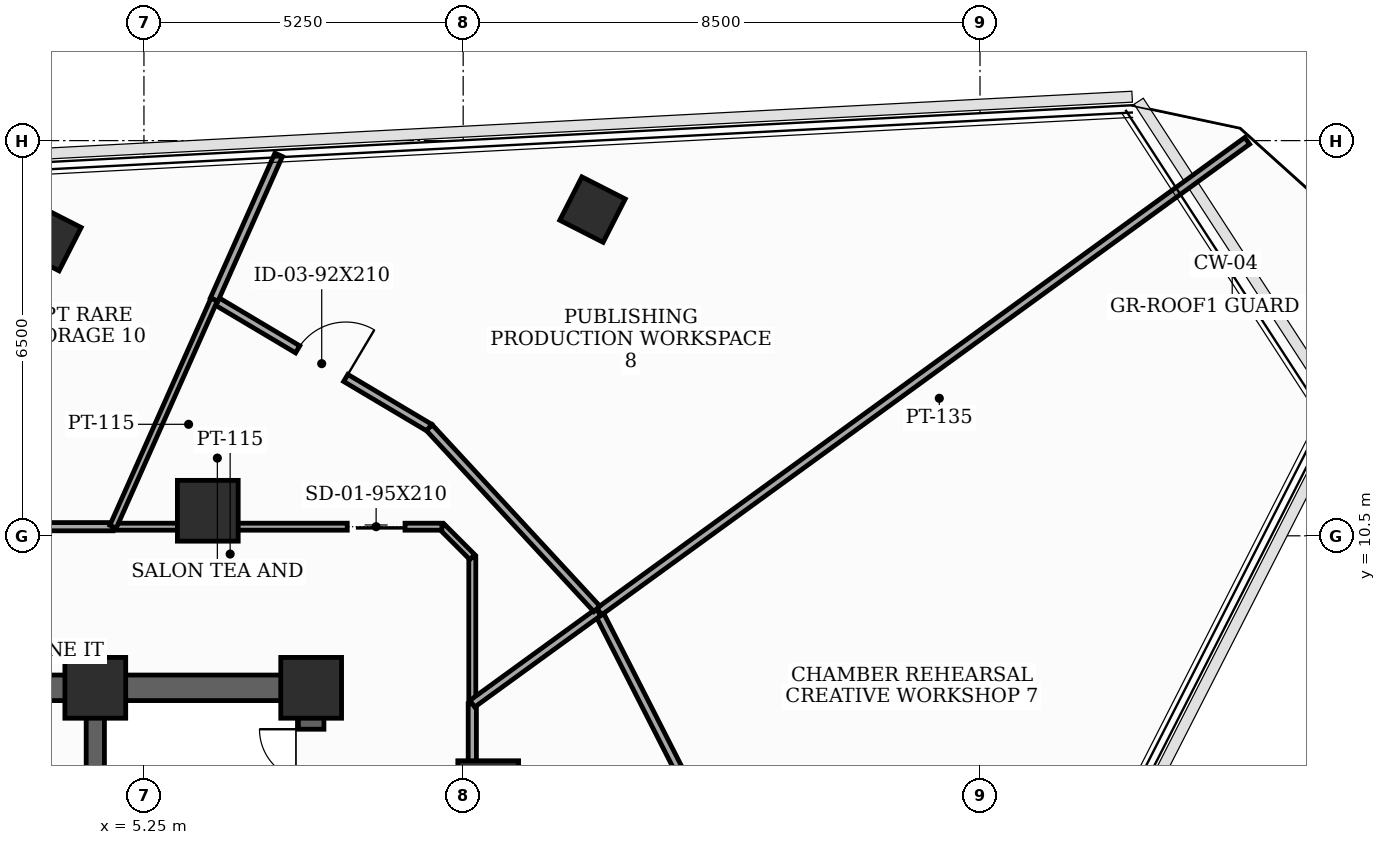
"""IFC4 building model, lengths in metres.
Left out: names, types, materials, properties, quantities, classifications, styles, units other than length and angle.
Written with IfcOpenShell. Run it as: python <this file> out.ifc"""

import sys

from ifc_helpers import new_model, si_unit, direction, frame, frame_2d, origin, origin_2d, place, context, subcontext, project, spatial, rectangle, extrude, element, fill, save


model = new_model("IFC4")
c1 = context("Model", 3, precision=1e-05, world=origin(), true_north=direction((0.0, 1.0)))
c2 = subcontext(c1, "Body", "Model", "MODEL_VIEW")
j1 = project(units=[si_unit("LENGTHUNIT", "METRE"), si_unit("PLANEANGLEUNIT", "RADIAN")], contexts=[c1])
p1 = place(None, origin())
s1 = spatial("IfcSite", under=j1, at=p1, CompositionType="ELEMENT")
p2 = place(p1, origin())
s2 = spatial("IfcBuilding", under=s1, at=p2, CompositionType="ELEMENT")
p3 = place(p2, frame((0.0, 0.0, 255.9)))
s3 = spatial("IfcBuildingStorey", under=s2, at=p3, CompositionType="ELEMENT", Elevation=255.9)
for number, where, z_axis, x_axis in (
    (1, (8.0, 8.0, 0.0), (0.0, 0.0, 1.0), (1.0, 0.0, 0.0)),
    (2, (4.45, 8.0, 0.0), (0.0, 0.0, 1.0), (1.0, 0.0, 0.0)),
    (3, (10.912, 6.3, 0.0), (0.0, 0.0, 1.0), (1.0, 0.0, 0.0)),
    (4, (6.3, 10.912, 0.0), (0.0, 0.0, 1.0), (1.0, 0.0, 0.0)),
):
    element("IfcColumn", number, at=place(p3, frame(where, z_axis=z_axis, x_axis=x_axis)), inside=s3, PredefinedType="COLUMN", context=c2, shape_type="SweptSolid", body=[
        extrude(rectangle(XDim=1.0, YDim=1.0, at=origin_2d()), origin(), (0.0, 0.0, 1.0), 3.7),
    ])
for number, where, z_axis, x_axis in (
    (5, (12.627, 15.865, 0.0), (0.0, 0.0, 1.0), (0.454, 0.891, 0.0)),
    (6, (3.679, 15.396, 0.0), (0.0, 0.0, 1.0), (0.454, 0.891, 0.0)),
):
    element("IfcColumn", number, at=place(p3, frame(where, z_axis=z_axis, x_axis=x_axis)), inside=s3, PredefinedType="COLUMN", context=c2, shape_type="SweptSolid", body=[
        extrude(rectangle(XDim=0.8, YDim=0.8, at=origin_2d()), origin(), (0.0, 0.0, 1.0), 3.7),
    ])
p4 = place(p3, frame((8.0, -8.0, 0.0), z_axis=(0.0, 0.0, 1.0), x_axis=(0.0, 1.0, 0.0)))
e7 = element("IfcWall", 7, at=p4, inside=s3, PredefinedType="SHEAR", context=c2, shape_type="SweptSolid", body=[
    extrude(rectangle(XDim=16.0, YDim=0.42, at=frame_2d((8.0, 0.0))), origin(), (0.0, 0.0, 1.0), 3.5),
])
p5 = place(p4, frame((9.6, 0.0, 0.0)))
e8 = element("IfcOpeningElement", 8, at=p5, cuts=e7, PredefinedType="OPENING", context=c2, shape_type="SweptSolid", body=[
    extrude(rectangle(XDim=1.05, YDim=2.15, at=frame_2d((0.525, 1.075))), frame((0.0, 0.22, 0.0), z_axis=(0.0, -1.0, 0.0), x_axis=(1.0, 0.0, 0.0)), (0.0, 0.0, 1.0), 0.44),
])
p6 = place(p4, frame((14.469, 0.0, 0.0)))
e9 = element("IfcOpeningElement", 9, at=p6, cuts=e7, PredefinedType="OPENING", context=c2, shape_type="SweptSolid", body=[
    extrude(rectangle(XDim=0.85, YDim=2.02, at=frame_2d((0.425, 1.01))), frame((0.0, 0.22, 0.0), z_axis=(0.0, -1.0, 0.0), x_axis=(1.0, 0.0, 0.0)), (0.0, 0.0, 1.0), 0.44),
])
p7 = place(p3, frame((-8.0, 8.0, 0.0), z_axis=(0.0, 0.0, 1.0), x_axis=(1.0, 0.0, 0.0)))
e10 = element("IfcWall", 10, at=p7, inside=s3, PredefinedType="SHEAR", context=c2, shape_type="SweptSolid", body=[
    extrude(rectangle(XDim=16.0, YDim=0.42, at=frame_2d((8.0, 0.0))), origin(), (0.0, 0.0, 1.0), 3.5),
])
p8 = place(p7, frame((7.1, 0.0, 0.0)))
e11 = element("IfcOpeningElement", 11, at=p8, cuts=e10, PredefinedType="OPENING", context=c2, shape_type="SweptSolid", body=[
    extrude(rectangle(XDim=1.8, YDim=2.15, at=frame_2d((0.9, 1.075))), frame((0.0, 0.22, 0.0), z_axis=(0.0, -1.0, 0.0), x_axis=(1.0, 0.0, 0.0)), (0.0, 0.0, 1.0), 0.44),
])
p9 = place(p3, frame((4.45, -7.79, 0.0), z_axis=(0.0, 0.0, 1.0), x_axis=(0.0, 1.0, 0.0)))
e12 = element("IfcWall", 12, at=p9, inside=s3, PredefinedType="SHEAR", context=c2, shape_type="SweptSolid", body=[
    extrude(rectangle(XDim=15.58, YDim=0.3, at=frame_2d((7.79, 0.0))), origin(), (0.0, 0.0, 1.0), 3.5),
])
p10 = place(p3, frame((10.65, 4.225, 0.0), z_axis=(0.0, 0.0, 1.0), x_axis=(0.0, 1.0, 0.0)))
e13 = element("IfcWall", 13, at=p10, inside=s3, PredefinedType="PARTITIONING", context=c2, shape_type="SweptSolid", body=[
    extrude(rectangle(XDim=3.513, YDim=0.135, at=frame_2d((1.756, 0.0))), origin(), (0.0, 0.0, 1.0), 2.885),
])
p11 = place(p3, frame((10.65, 7.738, 0.0), z_axis=(0.0, 0.0, 1.0), x_axis=(0.0, 1.0, 0.0)))
e14 = element("IfcWall", 14, at=p11, inside=s3, PredefinedType="PARTITIONING", context=c2, shape_type="SweptSolid", body=[
    extrude(rectangle(XDim=2.412, YDim=0.115, at=frame_2d((1.206, 0.0))), origin(), (0.0, 0.0, 1.0), 3.5),
])
p12 = place(p3, frame((10.65, 10.15, 0.0), z_axis=(0.0, 0.0, 1.0), x_axis=(-0.707106781187, 0.707106781187, 0.0)))
e15 = element("IfcWall", 15, at=p12, inside=s3, PredefinedType="PARTITIONING", context=c2, shape_type="SweptSolid", body=[
    extrude(rectangle(XDim=0.707, YDim=0.115, at=frame_2d((0.354, 0.0))), origin(), (0.0, 0.0, 1.0), 3.5),
])
p13 = place(p3, frame((10.15, 10.65, 0.0), z_axis=(0.0, 0.0, 1.0), x_axis=(-1.0, 0.0, 0.0)))
e16 = element("IfcWall", 16, at=p13, inside=s3, PredefinedType="PARTITIONING", context=c2, shape_type="SweptSolid", body=[
    extrude(rectangle(XDim=5.408, YDim=0.115, at=frame_2d((2.704, 0.0))), origin(), (0.0, 0.0, 1.0), 2.885),
])
p14 = place(p13, frame((0.607, 0.0, 0.0)))
e17 = element("IfcOpeningElement", 17, at=p14, cuts=e16, PredefinedType="OPENING", context=c2, shape_type="SweptSolid", body=[
    extrude(rectangle(XDim=0.95, YDim=2.1, at=frame_2d((0.475, 1.05))), frame((0.0, 0.067, 0.0), z_axis=(0.0, -1.0, 0.0), x_axis=(1.0, 0.0, 0.0)), (0.0, 0.0, 1.0), 0.135),
])
p15 = place(p3, frame((4.742, 10.65, 0.0), z_axis=(0.0, 0.0, 1.0), x_axis=(-1.0, 0.0, 0.0)))
e18 = element("IfcWall", 18, at=p15, inside=s3, PredefinedType="PARTITIONING", context=c2, shape_type="SweptSolid", body=[
    extrude(rectangle(XDim=5.892, YDim=0.135, at=frame_2d((2.946, 0.0))), origin(), (0.0, 0.0, 1.0), 2.885),
])
p16 = place(p15, frame((2.471, 0.0, 0.0)))
e19 = element("IfcOpeningElement", 19, at=p16, cuts=e18, PredefinedType="OPENING", context=c2, shape_type="SweptSolid", body=[
    extrude(rectangle(XDim=0.95, YDim=2.1, at=frame_2d((0.475, 1.05))), frame((0.0, 0.077, 0.0), z_axis=(0.0, -1.0, 0.0), x_axis=(1.0, 0.0, 0.0)), (0.0, 0.0, 1.0), 0.155),
])
p17 = place(p3, frame((15.149, 4.487, 0.0), z_axis=(0.0, 0.0, 1.0), x_axis=(-0.453912768225, 0.891046126102, 0.0)))
e20 = element("IfcWall", 20, at=p17, inside=s3, PredefinedType="PARTITIONING", context=c2, shape_type="SweptSolid", body=[
    extrude(rectangle(XDim=5.34, YDim=0.135, at=frame_2d((2.67, 0.0))), origin(), (0.0, 0.0, 1.0), 3.185),
])
p18 = place(p3, frame((12.725, 9.245, 0.0), z_axis=(0.0, 0.0, 1.0), x_axis=(-0.809135191367, -0.587622533683, 0.0)))
e21 = element("IfcWall", 21, at=p18, inside=s3, PredefinedType="PARTITIONING", context=c2, shape_type="SweptSolid", body=[
    extrude(rectangle(XDim=2.565, YDim=0.135, at=frame_2d((1.282, 0.0))), origin(), (0.0, 0.0, 1.0), 3.185),
])
p19 = place(p3, frame((23.394, 16.997, 0.0), z_axis=(0.0, 0.0, 1.0), x_axis=(-0.80901413128, -0.587789192985, 0.0)))
e22 = element("IfcWall", 22, at=p19, inside=s3, PredefinedType="PARTITIONING", context=c2, shape_type="SweptSolid", body=[
    extrude(rectangle(XDim=13.171, YDim=0.135, at=frame_2d((6.586, 0.0))), origin(), (0.0, 0.0, 1.0), 3.035),
])
p20 = place(p3, frame((6.404, 14.384, 0.0), z_axis=(0.0, 0.0, 1.0), x_axis=(0.859464079119, -0.511196143085, 0.0)))
e23 = element("IfcWall", 23, at=p20, inside=s3, PredefinedType="PARTITIONING", context=c2, shape_type="SweptSolid", body=[
    extrude(rectangle(XDim=4.118, YDim=0.135, at=frame_2d((2.059, 0.0))), origin(), (0.0, 0.0, 1.0), 3.035),
])
p21 = place(p20, frame((1.599, 0.0, 0.0)))
e24 = element("IfcOpeningElement", 24, at=p21, cuts=e23, PredefinedType="OPENING", context=c2, shape_type="SweptSolid", body=[
    extrude(rectangle(XDim=0.92, YDim=2.1, at=frame_2d((0.46, 1.05))), frame((0.0, 0.077, 0.0), z_axis=(0.0, -1.0, 0.0), x_axis=(1.0, 0.0, 0.0)), (0.0, 0.0, 1.0), 0.155),
])
p22 = place(p3, frame((9.943, 12.279, 0.0), z_axis=(0.0, 0.0, 1.0), x_axis=(0.678829604912, -0.734295831049, 0.0)))
e25 = element("IfcWall", 25, at=p22, inside=s3, PredefinedType="PARTITIONING", context=c2, shape_type="SweptSolid", body=[
    extrude(rectangle(XDim=4.058, YDim=0.135, at=frame_2d((2.029, 0.0))), origin(), (0.0, 0.0, 1.0), 3.185),
])
p23 = place(p3, frame((7.465, 16.766, 0.0), z_axis=(0.0, 0.0, 1.0), x_axis=(-0.406928703069, -0.913459922831, 0.0)))
e26 = element("IfcWall", 26, at=p23, inside=s3, PredefinedType="PARTITIONING", context=c2, shape_type="SweptSolid", body=[
    extrude(rectangle(XDim=2.608, YDim=0.135, at=frame_2d((1.304, 0.0))), origin(), (0.0, 0.0, 1.0), 3.035),
])
p24 = place(p3, frame((6.404, 14.384, 0.0), z_axis=(0.0, 0.0, 1.0), x_axis=(-0.406648271104, -0.913584798258, 0.0)))
e27 = element("IfcWall", 27, at=p24, inside=s3, PredefinedType="PARTITIONING", context=c2, shape_type="SweptSolid", body=[
    extrude(rectangle(XDim=4.087, YDim=0.115, at=frame_2d((2.044, 0.0))), origin(), (0.0, 0.0, 1.0), 2.885),
])
p25 = place(p6, origin())
e28 = element("IfcDoor", 28, at=p25, inside=s3, OperationType="SINGLE_SWING_RIGHT", PredefinedType="TRAPDOOR", context=c2, shape_type="SweptSolid", body=[
    extrude(rectangle(XDim=0.85, YDim=2.02, at=frame_2d((0.425, 1.01))), frame((0.0, 0.025, 0.0), z_axis=(0.0, -1.0, 0.0), x_axis=(1.0, 0.0, 0.0)), (0.0, 0.0, 1.0), 0.05),
])
fill(e9, e28)
p26 = place(p14, origin())
e29 = element("IfcDoor", 29, at=p26, inside=s3, OperationType="SLIDING_TO_LEFT", PredefinedType="DOOR", context=c2, shape_type="SweptSolid", body=[
    extrude(rectangle(XDim=0.95, YDim=2.1, at=frame_2d((0.475, 1.05))), frame((0.0, 0.025, 0.0), z_axis=(0.0, -1.0, 0.0), x_axis=(1.0, 0.0, 0.0)), (0.0, 0.0, 1.0), 0.05),
])
fill(e17, e29)
p27 = place(p21, origin())
e30 = element("IfcDoor", 30, at=p27, inside=s3, OperationType="SINGLE_SWING_RIGHT", PredefinedType="DOOR", context=c2, shape_type="SweptSolid", body=[
    extrude(rectangle(XDim=0.92, YDim=2.1, at=frame_2d((0.46, 1.05))), frame((0.0, 0.025, 0.0), z_axis=(0.0, -1.0, 0.0), x_axis=(1.0, 0.0, 0.0)), (0.0, 0.0, 1.0), 0.05),
])
fill(e24, e30)
save(model, sys.argv[1])
